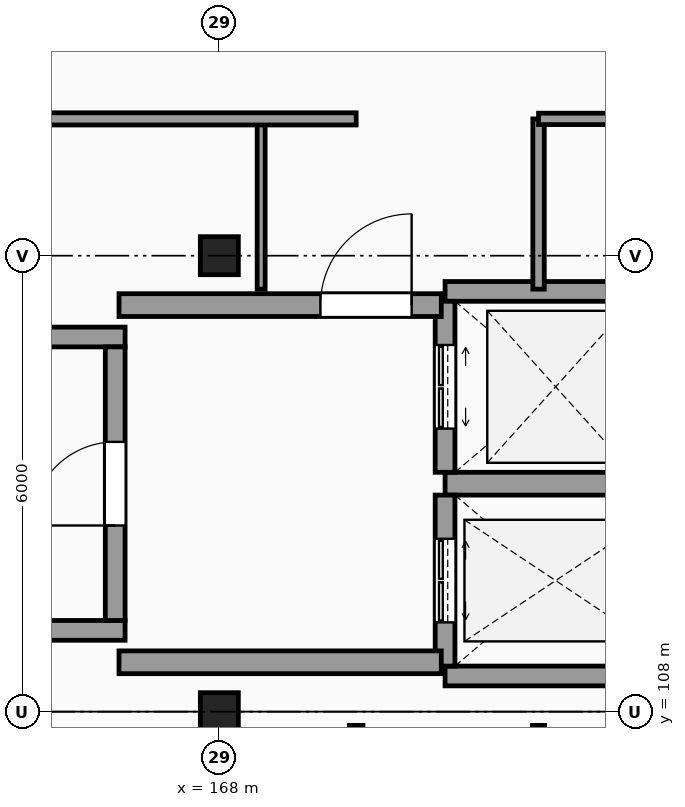
"""IFC4 building model, lengths in metres.
Left out: names, types, materials, properties, quantities, classifications, styles, units other than length and angle.
Written with IfcOpenShell. Run it as: python <this file> out.ifc"""

import sys

from ifc_helpers import new_model, si_unit, direction, frame, frame_2d, origin, origin_2d, place, context, subcontext, project, spatial, rectangle, extrude, element, fill, save


model = new_model("IFC4")
c1 = context("Model", 3, precision=1e-05, world=origin(), true_north=direction((0.0, 1.0)))
c2 = subcontext(c1, "Body", "Model", "MODEL_VIEW")
j1 = project(units=[si_unit("LENGTHUNIT", "METRE"), si_unit("PLANEANGLEUNIT", "RADIAN")], contexts=[c1])
p1 = place(None, origin())
s1 = spatial("IfcSite", under=j1, at=p1, CompositionType="ELEMENT")
p2 = place(p1, origin())
s2 = spatial("IfcBuilding", under=s1, at=p2, CompositionType="ELEMENT")
p3 = place(p2, frame((0.0, 0.0, 48.0)))
s3 = spatial("IfcBuildingStorey", under=s2, at=p3, CompositionType="ELEMENT", Elevation=48.0)
for number, where, z_axis, x_axis in (
    (1, (168.0, 108.0, 0.0), (0.0, 0.0, 1.0), (1.0, 0.0, 0.0)),
    (2, (168.0, 114.0, 0.0), (0.0, 0.0, 1.0), (1.0, 0.0, 0.0)),
):
    element("IfcColumn", number, at=place(p3, frame(where, z_axis=z_axis, x_axis=x_axis)), inside=s3, PredefinedType="COLUMN", context=c2, shape_type="SweptSolid", body=[
        extrude(rectangle(XDim=0.5, YDim=0.5, at=origin_2d()), origin(), (0.0, 0.0, 1.0), 3.3),
    ])
for number, where, z_axis, x_axis in (
    (3, (156.04, 109.07, 0.0), (0.0, 0.0, 1.0), (1.0, 0.0, 0.0)),
    (4, (156.04, 112.93, 0.0), (0.0, 0.0, 1.0), (1.0, 0.0, 0.0)),
):
    element("IfcWall", number, at=place(p3, frame(where, z_axis=z_axis, x_axis=x_axis)), inside=s3, PredefinedType="SHEAR", context=c2, shape_type="SweptSolid", body=[
        extrude(rectangle(XDim=10.72, YDim=0.26, at=frame_2d((5.36, 0.0))), origin(), (0.0, 0.0, 1.0), 3.3),
    ])
p4 = place(p3, frame((166.63, 109.2, 0.0), z_axis=(0.0, 0.0, 1.0), x_axis=(0.0, 1.0, 0.0)))
e5 = element("IfcWall", 5, at=p4, inside=s3, PredefinedType="SHEAR", context=c2, shape_type="SweptSolid", body=[
    extrude(rectangle(XDim=3.6, YDim=0.26, at=frame_2d((1.8, 0.0))), origin(), (0.0, 0.0, 1.0), 3.3),
])
p5 = place(p4, frame((1.25, 0.0, 0.0)))
e6 = element("IfcOpeningElement", 6, at=p5, cuts=e5, PredefinedType="OPENING", context=c2, shape_type="SweptSolid", body=[
    extrude(rectangle(XDim=1.1, YDim=2.15, at=frame_2d((0.55, 1.075))), frame((0.0, 0.14, 0.0), z_axis=(0.0, -1.0, 0.0), x_axis=(1.0, 0.0, 0.0)), (0.0, 0.0, 1.0), 0.28),
])
p6 = place(p3, frame((170.97, 108.47, 0.0), z_axis=(0.0, 0.0, 1.0), x_axis=(1.0, 0.0, 0.0)))
e7 = element("IfcWall", 7, at=p6, inside=s3, PredefinedType="SHEAR", context=c2, shape_type="SweptSolid", body=[
    extrude(rectangle(XDim=2.91, YDim=0.26, at=frame_2d((1.455, 0.0))), origin(), (0.0, 0.0, 1.0), 3.3),
])
p7 = place(p3, frame((170.97, 111.0, 0.0), z_axis=(0.0, 0.0, 1.0), x_axis=(1.0, 0.0, 0.0)))
e8 = element("IfcWall", 8, at=p7, inside=s3, PredefinedType="SHEAR", context=c2, shape_type="SweptSolid", body=[
    extrude(rectangle(XDim=2.91, YDim=0.3, at=frame_2d((1.455, 0.0))), origin(), (0.0, 0.0, 1.0), 3.3),
])
p8 = place(p3, frame((170.97, 108.6, 0.0), z_axis=(0.0, 0.0, 1.0), x_axis=(0.0, 1.0, 0.0)))
e9 = element("IfcWall", 9, at=p8, inside=s3, PredefinedType="SHEAR", context=c2, shape_type="SweptSolid", body=[
    extrude(rectangle(XDim=2.25, YDim=0.26, at=frame_2d((1.125, 0.0))), origin(), (0.0, 0.0, 1.0), 3.3),
])
p9 = place(p8, frame((0.575, 0.0, 0.0)))
e10 = element("IfcOpeningElement", 10, at=p9, cuts=e9, PredefinedType="OPENING", context=c2, shape_type="SweptSolid", body=[
    extrude(rectangle(XDim=1.1, YDim=2.2, at=frame_2d((0.55, 1.1))), frame((0.0, 0.14, 0.0), z_axis=(0.0, -1.0, 0.0), x_axis=(1.0, 0.0, 0.0)), (0.0, 0.0, 1.0), 0.28),
])
p10 = place(p3, frame((170.97, 113.53, 0.0), z_axis=(0.0, 0.0, 1.0), x_axis=(1.0, 0.0, 0.0)))
e11 = element("IfcWall", 11, at=p10, inside=s3, PredefinedType="SHEAR", context=c2, shape_type="SweptSolid", body=[
    extrude(rectangle(XDim=2.91, YDim=0.26, at=frame_2d((1.455, 0.0))), origin(), (0.0, 0.0, 1.0), 3.3),
])
p11 = place(p3, frame((170.97, 111.15, 0.0), z_axis=(0.0, 0.0, 1.0), x_axis=(0.0, 1.0, 0.0)))
e12 = element("IfcWall", 12, at=p11, inside=s3, PredefinedType="SHEAR", context=c2, shape_type="SweptSolid", body=[
    extrude(rectangle(XDim=2.25, YDim=0.26, at=frame_2d((1.125, 0.0))), origin(), (0.0, 0.0, 1.0), 3.3),
])
p12 = place(p11, frame((0.575, 0.0, 0.0)))
e13 = element("IfcOpeningElement", 13, at=p12, cuts=e12, PredefinedType="OPENING", context=c2, shape_type="SweptSolid", body=[
    extrude(rectangle(XDim=1.1, YDim=2.2, at=frame_2d((0.55, 1.1))), frame((0.0, 0.14, 0.0), z_axis=(0.0, -1.0, 0.0), x_axis=(1.0, 0.0, 0.0)), (0.0, 0.0, 1.0), 0.28),
])
p13 = place(p3, frame((166.68, 113.35, 0.0), z_axis=(0.0, 0.0, 1.0), x_axis=(1.0, 0.0, 0.0)))
e14 = element("IfcWall", 14, at=p13, inside=s3, PredefinedType="SHEAR", context=c2, shape_type="SweptSolid", body=[
    extrude(rectangle(XDim=4.24, YDim=0.3, at=frame_2d((2.12, 0.0))), origin(), (0.0, 0.0, 1.0), 3.3),
])
p14 = place(p13, frame((2.65, 0.0, 0.0)))
e15 = element("IfcOpeningElement", 15, at=p14, cuts=e14, PredefinedType="OPENING", context=c2, shape_type="SweptSolid", body=[
    extrude(rectangle(XDim=1.2, YDim=2.2, at=frame_2d((0.6, 1.1))), frame((0.0, 0.16, 0.0), z_axis=(0.0, -1.0, 0.0), x_axis=(1.0, 0.0, 0.0)), (0.0, 0.0, 1.0), 0.32),
])
p15 = place(p3, frame((166.68, 108.65, 0.0), z_axis=(0.0, 0.0, 1.0), x_axis=(1.0, 0.0, 0.0)))
e16 = element("IfcWall", 16, at=p15, inside=s3, PredefinedType="SHEAR", context=c2, shape_type="SweptSolid", body=[
    extrude(rectangle(XDim=4.24, YDim=0.3, at=frame_2d((2.12, 0.0))), origin(), (0.0, 0.0, 1.0), 3.3),
])
p16 = place(p3, frame((168.55, 113.56, 0.0), z_axis=(0.0, 0.0, 1.0), x_axis=(0.0, 1.0, 0.0)))
e17 = element("IfcWall", 17, at=p16, inside=s3, PredefinedType="PARTITIONING", context=c2, shape_type="SweptSolid", body=[
    extrude(rectangle(XDim=2.24, YDim=0.105, at=frame_2d((1.12, 0.0))), origin(), (0.0, 0.0, 1.0), 3.05),
])
p17 = place(p3, frame((169.8, 66.235, 0.0), z_axis=(0.0, 0.0, 1.0), x_axis=(0.0, 1.0, 0.0)))
e18 = element("IfcWall", 18, at=p17, inside=s3, PredefinedType="PARTITIONING", context=c2, shape_type="SweptSolid", body=[
    extrude(rectangle(XDim=41.585, YDim=0.18, at=frame_2d((20.792, 0.0))), origin(), (0.0, 0.0, 1.0), 3.05),
])
p18 = place(p17, frame((26.165, 0.0, 0.0)))
e19 = element("IfcOpeningElement", 19, at=p18, cuts=e18, PredefinedType="OPENING", context=c2, shape_type="SweptSolid", body=[
    extrude(rectangle(XDim=1.2, YDim=2.2, at=frame_2d((0.6, 1.1))), frame((0.0, 0.1, 0.0), z_axis=(0.0, -1.0, 0.0), x_axis=(1.0, 0.0, 0.0)), (0.0, 0.0, 1.0), 0.2),
])
p19 = place(p17, frame((0.44, 0.0, 0.0)))
e20 = element("IfcOpeningElement", 20, at=p19, cuts=e18, PredefinedType="OPENING", context=c2, shape_type="SweptSolid", body=[
    extrude(rectangle(XDim=0.95, YDim=2.1, at=frame_2d((0.475, 1.05))), frame((0.0, 0.1, 0.0), z_axis=(0.0, -1.0, 0.0), x_axis=(1.0, 0.0, 0.0)), (0.0, 0.0, 1.0), 0.2),
])
p20 = place(p17, frame((6.49, 0.0, 0.0)))
e21 = element("IfcOpeningElement", 21, at=p20, cuts=e18, PredefinedType="OPENING", context=c2, shape_type="SweptSolid", body=[
    extrude(rectangle(XDim=0.95, YDim=2.1, at=frame_2d((0.475, 1.05))), frame((0.0, 0.1, 0.0), z_axis=(0.0, -1.0, 0.0), x_axis=(1.0, 0.0, 0.0)), (0.0, 0.0, 1.0), 0.2),
])
p21 = place(p17, frame((30.49, 0.0, 0.0)))
e22 = element("IfcOpeningElement", 22, at=p21, cuts=e18, PredefinedType="OPENING", context=c2, shape_type="SweptSolid", body=[
    extrude(rectangle(XDim=0.95, YDim=2.1, at=frame_2d((0.475, 1.05))), frame((0.0, 0.1, 0.0), z_axis=(0.0, -1.0, 0.0), x_axis=(1.0, 0.0, 0.0)), (0.0, 0.0, 1.0), 0.2),
])
p22 = place(p17, frame((36.49, 0.0, 0.0)))
e23 = element("IfcOpeningElement", 23, at=p22, cuts=e18, PredefinedType="OPENING", context=c2, shape_type="SweptSolid", body=[
    extrude(rectangle(XDim=0.95, YDim=2.1, at=frame_2d((0.475, 1.05))), frame((0.0, 0.1, 0.0), z_axis=(0.0, -1.0, 0.0), x_axis=(1.0, 0.0, 0.0)), (0.0, 0.0, 1.0), 0.2),
])
p23 = place(p3, frame((172.2, 66.235, 0.0), z_axis=(0.0, 0.0, 1.0), x_axis=(0.0, 1.0, 0.0)))
e24 = element("IfcWall", 24, at=p23, inside=s3, PredefinedType="PARTITIONING", context=c2, shape_type="SweptSolid", body=[
    extrude(rectangle(XDim=41.585, YDim=0.16, at=frame_2d((20.792, 0.0))), origin(), (0.0, 0.0, 1.0), 3.05),
])
p24 = place(p23, frame((7.59, 0.0, 0.0)))
e25 = element("IfcOpeningElement", 25, at=p24, cuts=e24, PredefinedType="OPENING", context=c2, shape_type="SweptSolid", body=[
    extrude(rectangle(XDim=0.95, YDim=2.1, at=frame_2d((0.475, 1.05))), frame((0.0, 0.09, 0.0), z_axis=(0.0, -1.0, 0.0), x_axis=(1.0, 0.0, 0.0)), (0.0, 0.0, 1.0), 0.18),
])
p25 = place(p23, frame((12.09, 0.0, 0.0)))
e26 = element("IfcOpeningElement", 26, at=p25, cuts=e24, PredefinedType="OPENING", context=c2, shape_type="SweptSolid", body=[
    extrude(rectangle(XDim=0.95, YDim=2.1, at=frame_2d((0.475, 1.05))), frame((0.0, 0.09, 0.0), z_axis=(0.0, -1.0, 0.0), x_axis=(1.0, 0.0, 0.0)), (0.0, 0.0, 1.0), 0.18),
])
p26 = place(p23, frame((16.29, 0.0, 0.0)))
e27 = element("IfcOpeningElement", 27, at=p26, cuts=e24, PredefinedType="OPENING", context=c2, shape_type="SweptSolid", body=[
    extrude(rectangle(XDim=0.95, YDim=2.1, at=frame_2d((0.475, 1.05))), frame((0.0, 0.09, 0.0), z_axis=(0.0, -1.0, 0.0), x_axis=(1.0, 0.0, 0.0)), (0.0, 0.0, 1.0), 0.18),
])
p27 = place(p23, frame((18.49, 0.0, 0.0)))
e28 = element("IfcOpeningElement", 28, at=p27, cuts=e24, PredefinedType="OPENING", context=c2, shape_type="SweptSolid", body=[
    extrude(rectangle(XDim=0.95, YDim=2.1, at=frame_2d((0.475, 1.05))), frame((0.0, 0.09, 0.0), z_axis=(0.0, -1.0, 0.0), x_axis=(1.0, 0.0, 0.0)), (0.0, 0.0, 1.0), 0.18),
])
p28 = place(p23, frame((24.49, 0.0, 0.0)))
e29 = element("IfcOpeningElement", 29, at=p28, cuts=e24, PredefinedType="OPENING", context=c2, shape_type="SweptSolid", body=[
    extrude(rectangle(XDim=0.95, YDim=2.1, at=frame_2d((0.475, 1.05))), frame((0.0, 0.09, 0.0), z_axis=(0.0, -1.0, 0.0), x_axis=(1.0, 0.0, 0.0)), (0.0, 0.0, 1.0), 0.18),
])
p29 = place(p23, frame((38.34, 0.0, 0.0)))
e30 = element("IfcOpeningElement", 30, at=p29, cuts=e24, PredefinedType="OPENING", context=c2, shape_type="SweptSolid", body=[
    extrude(rectangle(XDim=0.95, YDim=2.1, at=frame_2d((0.475, 1.05))), frame((0.0, 0.09, 0.0), z_axis=(0.0, -1.0, 0.0), x_axis=(1.0, 0.0, 0.0)), (0.0, 0.0, 1.0), 0.18),
])
p30 = place(p3, frame((172.2, 113.56, 0.0), z_axis=(0.0, 0.0, 1.0), x_axis=(0.0, 1.0, 0.0)))
e31 = element("IfcWall", 31, at=p30, inside=s3, PredefinedType="PARTITIONING", context=c2, shape_type="SweptSolid", body=[
    extrude(rectangle(XDim=2.24, YDim=0.15, at=frame_2d((1.12, 0.0))), origin(), (0.0, 0.0, 1.0), 3.05),
])
p31 = place(p3, frame((102.235, 115.8, 0.0), z_axis=(0.0, 0.0, 1.0), x_axis=(1.0, 0.0, 0.0)))
e32 = element("IfcWall", 32, at=p31, inside=s3, PredefinedType="PARTITIONING", context=c2, shape_type="SweptSolid", body=[
    extrude(rectangle(XDim=67.565, YDim=0.16, at=frame_2d((33.782, 0.0))), origin(), (0.0, 0.0, 1.0), 3.05),
])
p32 = place(p31, frame((44.165, 0.0, 0.0)))
e33 = element("IfcOpeningElement", 33, at=p32, cuts=e32, PredefinedType="OPENING", context=c2, shape_type="SweptSolid", body=[
    extrude(rectangle(XDim=1.2, YDim=2.2, at=frame_2d((0.6, 1.1))), frame((0.0, 0.09, 0.0), z_axis=(0.0, -1.0, 0.0), x_axis=(1.0, 0.0, 0.0)), (0.0, 0.0, 1.0), 0.18),
])
p33 = place(p31, frame((14.165, 0.0, 0.0)))
e34 = element("IfcOpeningElement", 34, at=p33, cuts=e32, PredefinedType="OPENING", context=c2, shape_type="SweptSolid", body=[
    extrude(rectangle(XDim=1.2, YDim=2.2, at=frame_2d((0.6, 1.1))), frame((0.0, 0.09, 0.0), z_axis=(0.0, -1.0, 0.0), x_axis=(1.0, 0.0, 0.0)), (0.0, 0.0, 1.0), 0.18),
])
p34 = place(p31, frame((19.315, 0.0, 0.0)))
e35 = element("IfcOpeningElement", 35, at=p34, cuts=e32, PredefinedType="OPENING", context=c2, shape_type="SweptSolid", body=[
    extrude(rectangle(XDim=1.0, YDim=2.15, at=frame_2d((0.5, 1.075))), frame((0.0, 0.09, 0.0), z_axis=(0.0, -1.0, 0.0), x_axis=(1.0, 0.0, 0.0)), (0.0, 0.0, 1.0), 0.18),
])
p35 = place(p31, frame((26.285, 0.0, 0.0)))
e36 = element("IfcOpeningElement", 36, at=p35, cuts=e32, PredefinedType="OPENING", context=c2, shape_type="SweptSolid", body=[
    extrude(rectangle(XDim=0.96, YDim=2.15, at=frame_2d((0.48, 1.075))), frame((0.0, 0.09, 0.0), z_axis=(0.0, -1.0, 0.0), x_axis=(1.0, 0.0, 0.0)), (0.0, 0.0, 1.0), 0.18),
])
p36 = place(p31, frame((49.965, 0.0, 0.0)))
e37 = element("IfcOpeningElement", 37, at=p36, cuts=e32, PredefinedType="OPENING", context=c2, shape_type="SweptSolid", body=[
    extrude(rectangle(XDim=1.6, YDim=2.25, at=frame_2d((0.8, 1.125))), frame((0.0, 0.09, 0.0), z_axis=(0.0, -1.0, 0.0), x_axis=(1.0, 0.0, 0.0)), (0.0, 0.0, 1.0), 0.18),
])
p37 = place(p3, frame((172.2, 115.8, 0.0), z_axis=(0.0, 0.0, 1.0), x_axis=(1.0, 0.0, 0.0)))
e38 = element("IfcWall", 38, at=p37, inside=s3, PredefinedType="PARTITIONING", context=c2, shape_type="SweptSolid", body=[
    extrude(rectangle(XDim=4.3, YDim=0.15, at=frame_2d((2.15, 0.0))), origin(), (0.0, 0.0, 1.0), 3.05),
])
p38 = place(p37, frame((2.62, 0.0, 0.0)))
e39 = element("IfcOpeningElement", 39, at=p38, cuts=e38, PredefinedType="OPENING", context=c2, shape_type="SweptSolid", body=[
    extrude(rectangle(XDim=0.96, YDim=2.15, at=frame_2d((0.48, 1.075))), frame((0.0, 0.085, 0.0), z_axis=(0.0, -1.0, 0.0), x_axis=(1.0, 0.0, 0.0)), (0.0, 0.0, 1.0), 0.17),
])
p39 = place(p5, origin())
e40 = element("IfcDoor", 40, at=p39, inside=s3, OperationType="SINGLE_SWING_LEFT", PredefinedType="DOOR", context=c2, shape_type="SweptSolid", body=[
    extrude(rectangle(XDim=1.1, YDim=2.15, at=frame_2d((0.55, 1.075))), frame((0.0, 0.025, 0.0), z_axis=(0.0, -1.0, 0.0), x_axis=(1.0, 0.0, 0.0)), (0.0, 0.0, 1.0), 0.05),
])
fill(e6, e40)
p40 = place(p9, origin())
e41 = element("IfcDoor", 41, at=p40, inside=s3, OperationType="DOUBLE_DOOR_SLIDING", PredefinedType="DOOR", context=c2, shape_type="SweptSolid", body=[
    extrude(rectangle(XDim=1.1, YDim=2.2, at=frame_2d((0.55, 1.1))), frame((0.0, 0.025, 0.0), z_axis=(0.0, -1.0, 0.0), x_axis=(1.0, 0.0, 0.0)), (0.0, 0.0, 1.0), 0.05),
])
fill(e10, e41)
p41 = place(p12, origin())
e42 = element("IfcDoor", 42, at=p41, inside=s3, OperationType="DOUBLE_DOOR_SLIDING", PredefinedType="DOOR", context=c2, shape_type="SweptSolid", body=[
    extrude(rectangle(XDim=1.1, YDim=2.2, at=frame_2d((0.55, 1.1))), frame((0.0, 0.025, 0.0), z_axis=(0.0, -1.0, 0.0), x_axis=(1.0, 0.0, 0.0)), (0.0, 0.0, 1.0), 0.05),
])
fill(e13, e42)
p42 = place(p14, origin())
e43 = element("IfcDoor", 43, at=p42, inside=s3, OperationType="SINGLE_SWING_RIGHT", PredefinedType="DOOR", context=c2, shape_type="SweptSolid", body=[
    extrude(rectangle(XDim=1.2, YDim=2.2, at=frame_2d((0.6, 1.1))), frame((0.0, 0.025, 0.0), z_axis=(0.0, -1.0, 0.0), x_axis=(1.0, 0.0, 0.0)), (0.0, 0.0, 1.0), 0.05),
])
fill(e15, e43)
save(model, sys.argv[1])
